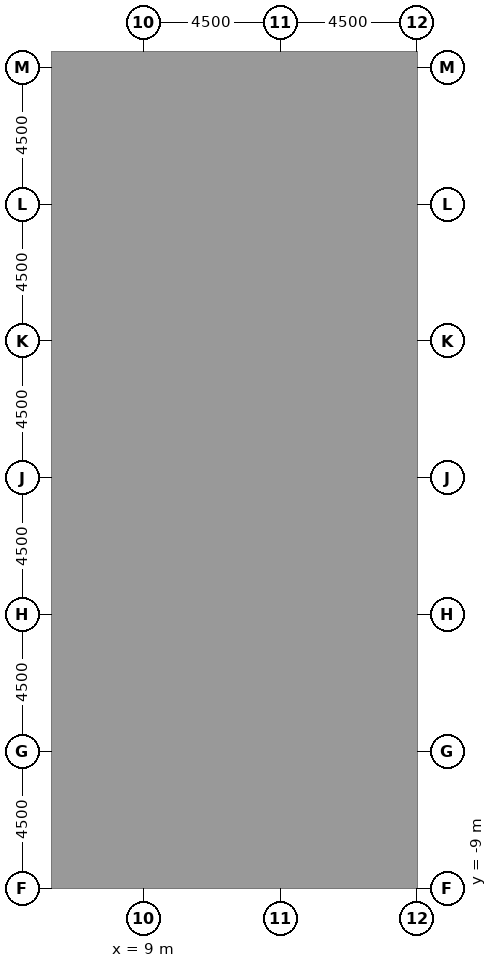
"""IFC4 building model, lengths in metres.
Left out: names, types, materials, properties, quantities, classifications, styles, units other than length and angle.
Written with IfcOpenShell. Run it as: python <this file> out.ifc"""

import sys

from ifc_helpers import new_model, si_unit, direction, frame, frame_2d, origin, place, context, subcontext, project, spatial, rectangle, extrude, element, fill, save


model = new_model("IFC4")
c1 = context("Model", 3, precision=1e-05, world=origin(), true_north=direction((0.0, 1.0)))
c2 = subcontext(c1, "Body", "Model", "MODEL_VIEW")
j1 = project(units=[si_unit("LENGTHUNIT", "METRE"), si_unit("PLANEANGLEUNIT", "RADIAN")], contexts=[c1])
p1 = place(None, origin())
s1 = spatial("IfcSite", under=j1, at=p1, CompositionType="ELEMENT")
p2 = place(p1, origin())
s2 = spatial("IfcBuilding", under=s1, at=p2, CompositionType="ELEMENT")
p3 = place(p2, origin())
s3 = spatial("IfcBuildingStorey", under=s2, at=p3, CompositionType="ELEMENT", Elevation=0.0)
p4 = place(p3, frame((6.5, -9.0, 0.0), z_axis=(0.0, 0.0, 1.0), x_axis=(0.0, 1.0, 0.0)))
e1 = element("IfcWall", 1, at=p4, inside=s3, PredefinedType="SHEAR", context=c2, shape_type="SweptSolid", body=[
    extrude(rectangle(XDim=27.5, YDim=1.0, at=frame_2d((13.75, 0.0))), origin(), (0.0, 0.0, 1.0), 7.2),
])
p5 = place(p4, frame((12.55, 0.0, 0.0)))
e2 = element("IfcOpeningElement", 2, at=p5, cuts=e1, PredefinedType="OPENING", context=c2, shape_type="SweptSolid", body=[
    extrude(rectangle(XDim=2.4, YDim=2.4, at=frame_2d((1.2, 1.2))), frame((0.0, 0.51, 0.0), z_axis=(0.0, -1.0, 0.0), x_axis=(1.0, 0.0, 0.0)), (0.0, 0.0, 1.0), 1.02),
])
p6 = place(p4, frame((3.955, 0.0, 0.0)))
e3 = element("IfcOpeningElement", 3, at=p6, cuts=e1, PredefinedType="OPENING", context=c2, shape_type="SweptSolid", body=[
    extrude(rectangle(XDim=0.905, YDim=2.1, at=frame_2d((0.453, 1.05))), frame((0.0, 0.51, 0.0), z_axis=(0.0, -1.0, 0.0), x_axis=(1.0, 0.0, 0.0)), (0.0, 0.0, 1.0), 1.02),
])
p7 = place(p4, frame((23.363, 0.0, 0.0)))
e4 = element("IfcOpeningElement", 4, at=p7, cuts=e1, PredefinedType="OPENING", context=c2, shape_type="SweptSolid", body=[
    extrude(rectangle(XDim=1.2, YDim=2.1, at=frame_2d((0.6, 1.05))), frame((0.0, 0.51, 0.0), z_axis=(0.0, -1.0, 0.0), x_axis=(1.0, 0.0, 0.0)), (0.0, 0.0, 1.0), 1.02),
])
p8 = place(p3, frame((17.5, -9.0, 0.0), z_axis=(0.0, 0.0, 1.0), x_axis=(0.0, 1.0, 0.0)))
e5 = element("IfcWall", 5, at=p8, inside=s3, PredefinedType="SHEAR", context=c2, shape_type="SweptSolid", body=[
    extrude(rectangle(XDim=27.5, YDim=1.0, at=frame_2d((13.75, 0.0))), origin(), (0.0, 0.0, 1.0), 7.2),
])
p9 = place(p8, frame((12.55, 0.0, 0.0)))
e6 = element("IfcOpeningElement", 6, at=p9, cuts=e5, PredefinedType="OPENING", context=c2, shape_type="SweptSolid", body=[
    extrude(rectangle(XDim=2.4, YDim=2.4, at=frame_2d((1.2, 1.2))), frame((0.0, 0.51, 0.0), z_axis=(0.0, -1.0, 0.0), x_axis=(1.0, 0.0, 0.0)), (0.0, 0.0, 1.0), 1.02),
])
p10 = place(p8, frame((6.825, 0.0, 0.0)))
e7 = element("IfcOpeningElement", 7, at=p10, cuts=e5, PredefinedType="OPENING", context=c2, shape_type="SweptSolid", body=[
    extrude(rectangle(XDim=1.2, YDim=2.1, at=frame_2d((0.6, 1.05))), frame((0.0, 0.51, 0.0), z_axis=(0.0, -1.0, 0.0), x_axis=(1.0, 0.0, 0.0)), (0.0, 0.0, 1.0), 1.02),
])
p11 = place(p8, frame((19.475, 0.0, 0.0)))
e8 = element("IfcOpeningElement", 8, at=p11, cuts=e5, PredefinedType="OPENING", context=c2, shape_type="SweptSolid", body=[
    extrude(rectangle(XDim=1.2, YDim=2.1, at=frame_2d((0.6, 1.05))), frame((0.0, 0.51, 0.0), z_axis=(0.0, -1.0, 0.0), x_axis=(1.0, 0.0, 0.0)), (0.0, 0.0, 1.0), 1.02),
])
for number, where, z_axis, x_axis in (
    (9, (7.0, -8.5, 0.0), (0.0, 0.0, 1.0), (1.0, 0.0, 0.0)),
    (10, (7.0, 18.0, 0.0), (0.0, 0.0, 1.0), (1.0, 0.0, 0.0)),
):
    element("IfcWall", number, at=place(p3, frame(where, z_axis=z_axis, x_axis=x_axis)), inside=s3, PredefinedType="SHEAR", context=c2, shape_type="SweptSolid", body=[
        extrude(rectangle(XDim=10.0, YDim=1.0, at=frame_2d((5.0, 0.0))), origin(), (0.0, 0.0, 1.0), 7.2),
    ])
p12 = place(p3, frame((7.0, -0.5, 0.0), z_axis=(0.0, 0.0, 1.0), x_axis=(1.0, 0.0, 0.0)))
e11 = element("IfcWall", 11, at=p12, inside=s3, PredefinedType="SHEAR", context=c2, shape_type="SweptSolid", body=[
    extrude(rectangle(XDim=10.0, YDim=0.5, at=frame_2d((5.0, 0.0))), origin(), (0.0, 0.0, 1.0), 7.2),
])
p13 = place(p3, frame((7.0, 2.8, 0.0), z_axis=(0.0, 0.0, 1.0), x_axis=(1.0, 0.0, 0.0)))
e12 = element("IfcWall", 12, at=p13, inside=s3, PredefinedType="SHEAR", context=c2, shape_type="SweptSolid", body=[
    extrude(rectangle(XDim=10.0, YDim=0.5, at=frame_2d((5.0, 0.0))), origin(), (0.0, 0.0, 1.0), 7.2),
])
p14 = place(p13, frame((0.512, 0.0, 0.0)))
e13 = element("IfcOpeningElement", 13, at=p14, cuts=e12, PredefinedType="OPENING", context=c2, shape_type="SweptSolid", body=[
    extrude(rectangle(XDim=1.1, YDim=2.1, at=frame_2d((0.55, 1.05))), frame((0.0, 0.26, 0.0), z_axis=(0.0, -1.0, 0.0), x_axis=(1.0, 0.0, 0.0)), (0.0, 0.0, 1.0), 0.52),
])
p15 = place(p13, frame((3.137, 0.0, 0.0)))
e14 = element("IfcOpeningElement", 14, at=p15, cuts=e12, PredefinedType="OPENING", context=c2, shape_type="SweptSolid", body=[
    extrude(rectangle(XDim=1.1, YDim=2.1, at=frame_2d((0.55, 1.05))), frame((0.0, 0.26, 0.0), z_axis=(0.0, -1.0, 0.0), x_axis=(1.0, 0.0, 0.0)), (0.0, 0.0, 1.0), 0.52),
])
p16 = place(p13, frame((5.762, 0.0, 0.0)))
e15 = element("IfcOpeningElement", 15, at=p16, cuts=e12, PredefinedType="OPENING", context=c2, shape_type="SweptSolid", body=[
    extrude(rectangle(XDim=1.1, YDim=2.1, at=frame_2d((0.55, 1.05))), frame((0.0, 0.26, 0.0), z_axis=(0.0, -1.0, 0.0), x_axis=(1.0, 0.0, 0.0)), (0.0, 0.0, 1.0), 0.52),
])
p17 = place(p13, frame((8.387, 0.0, 0.0)))
e16 = element("IfcOpeningElement", 16, at=p17, cuts=e12, PredefinedType="OPENING", context=c2, shape_type="SweptSolid", body=[
    extrude(rectangle(XDim=1.1, YDim=2.1, at=frame_2d((0.55, 1.05))), frame((0.0, 0.26, 0.0), z_axis=(0.0, -1.0, 0.0), x_axis=(1.0, 0.0, 0.0)), (0.0, 0.0, 1.0), 0.52),
])
p18 = place(p3, frame((7.0, 6.7, 0.0), z_axis=(0.0, 0.0, 1.0), x_axis=(1.0, 0.0, 0.0)))
e17 = element("IfcWall", 17, at=p18, inside=s3, PredefinedType="SHEAR", context=c2, shape_type="SweptSolid", body=[
    extrude(rectangle(XDim=10.0, YDim=0.5, at=frame_2d((5.0, 0.0))), origin(), (0.0, 0.0, 1.0), 7.2),
])
p19 = place(p18, frame((0.512, 0.0, 0.0)))
e18 = element("IfcOpeningElement", 18, at=p19, cuts=e17, PredefinedType="OPENING", context=c2, shape_type="SweptSolid", body=[
    extrude(rectangle(XDim=1.1, YDim=2.1, at=frame_2d((0.55, 1.05))), frame((0.0, 0.26, 0.0), z_axis=(0.0, -1.0, 0.0), x_axis=(1.0, 0.0, 0.0)), (0.0, 0.0, 1.0), 0.52),
])
p20 = place(p18, frame((3.188, 0.0, 0.0)))
e19 = element("IfcOpeningElement", 19, at=p20, cuts=e17, PredefinedType="OPENING", context=c2, shape_type="SweptSolid", body=[
    extrude(rectangle(XDim=1.0, YDim=2.1, at=frame_2d((0.5, 1.05))), frame((0.0, 0.26, 0.0), z_axis=(0.0, -1.0, 0.0), x_axis=(1.0, 0.0, 0.0)), (0.0, 0.0, 1.0), 0.52),
])
p21 = place(p18, frame((5.812, 0.0, 0.0)))
e20 = element("IfcOpeningElement", 20, at=p21, cuts=e17, PredefinedType="OPENING", context=c2, shape_type="SweptSolid", body=[
    extrude(rectangle(XDim=1.0, YDim=2.1, at=frame_2d((0.5, 1.05))), frame((0.0, 0.26, 0.0), z_axis=(0.0, -1.0, 0.0), x_axis=(1.0, 0.0, 0.0)), (0.0, 0.0, 1.0), 0.52),
])
p22 = place(p18, frame((8.438, 0.0, 0.0)))
e21 = element("IfcOpeningElement", 21, at=p22, cuts=e17, PredefinedType="OPENING", context=c2, shape_type="SweptSolid", body=[
    extrude(rectangle(XDim=1.0, YDim=2.1, at=frame_2d((0.5, 1.05))), frame((0.0, 0.26, 0.0), z_axis=(0.0, -1.0, 0.0), x_axis=(1.0, 0.0, 0.0)), (0.0, 0.0, 1.0), 0.52),
])
p23 = place(p3, frame((7.0, 10.0, 0.0), z_axis=(0.0, 0.0, 1.0), x_axis=(1.0, 0.0, 0.0)))
e22 = element("IfcWall", 22, at=p23, inside=s3, PredefinedType="SHEAR", context=c2, shape_type="SweptSolid", body=[
    extrude(rectangle(XDim=10.0, YDim=0.5, at=frame_2d((5.0, 0.0))), origin(), (0.0, 0.0, 1.0), 7.2),
])
for number, where, z_axis, x_axis in (
    (23, (9.375, -0.25, 0.0), (0.0, 0.0, 1.0), (0.0, 1.0, 0.0)),
    (24, (9.375, 6.95, 0.0), (0.0, 0.0, 1.0), (0.0, 1.0, 0.0)),
    (25, (12.0, -0.25, 0.0), (0.0, 0.0, 1.0), (0.0, 1.0, 0.0)),
    (26, (12.0, 6.95, 0.0), (0.0, 0.0, 1.0), (0.0, 1.0, 0.0)),
    (27, (14.625, -0.25, 0.0), (0.0, 0.0, 1.0), (0.0, 1.0, 0.0)),
    (28, (14.625, 6.95, 0.0), (0.0, 0.0, 1.0), (0.0, 1.0, 0.0)),
):
    element("IfcWall", number, at=place(p3, frame(where, z_axis=z_axis, x_axis=x_axis)), inside=s3, PredefinedType="SHEAR", context=c2, shape_type="SweptSolid", body=[
        extrude(rectangle(XDim=2.8, YDim=0.5, at=frame_2d((1.4, 0.0))), origin(), (0.0, 0.0, 1.0), 7.2),
    ])
for number, where, z_axis, x_axis in (
    (29, (12.0, -8.0, 0.0), (0.0, 0.0, 1.0), (0.0, 1.0, 0.0)),
    (30, (12.0, 10.25, 0.0), (0.0, 0.0, 1.0), (0.0, 1.0, 0.0)),
):
    element("IfcWall", number, at=place(p3, frame(where, z_axis=z_axis, x_axis=x_axis)), inside=s3, PredefinedType="SHEAR", context=c2, shape_type="SweptSolid", body=[
        extrude(rectangle(XDim=7.25, YDim=0.5, at=frame_2d((3.625, 0.0))), origin(), (0.0, 0.0, 1.0), 7.2),
    ])
p24 = place(p3, frame((7.0, -5.245, 0.0), z_axis=(0.0, 0.0, 1.0), x_axis=(1.0, 0.0, 0.0)))
e31 = element("IfcWall", 31, at=p24, inside=s3, PredefinedType="PARTITIONING", context=c2, shape_type="SweptSolid", body=[
    extrude(rectangle(XDim=4.75, YDim=0.1, at=frame_2d((2.375, 0.0))), origin(), (0.0, 0.0, 1.0), 6.75),
])
p25 = place(p24, frame((1.875, 0.0, 0.0)))
e32 = element("IfcOpeningElement", 32, at=p25, cuts=e31, PredefinedType="OPENING", context=c2, shape_type="SweptSolid", body=[
    extrude(rectangle(XDim=1.0, YDim=2.1, at=frame_2d((0.5, 1.05))), frame((0.0, 0.06, 0.0), z_axis=(0.0, -1.0, 0.0), x_axis=(1.0, 0.0, 0.0)), (0.0, 0.0, 1.0), 0.12),
])
p26 = place(p3, frame((7.0, -3.94, 0.0), z_axis=(0.0, 0.0, 1.0), x_axis=(1.0, 0.0, 0.0)))
e33 = element("IfcWall", 33, at=p26, inside=s3, PredefinedType="PARTITIONING", context=c2, shape_type="SweptSolid", body=[
    extrude(rectangle(XDim=2.945, YDim=0.1, at=frame_2d((1.473, 0.0))), origin(), (0.0, 0.0, 1.0), 6.75),
])
p27 = place(p26, frame((0.972, 0.0, 0.0)))
e34 = element("IfcOpeningElement", 34, at=p27, cuts=e33, PredefinedType="OPENING", context=c2, shape_type="SweptSolid", body=[
    extrude(rectangle(XDim=1.0, YDim=2.1, at=frame_2d((0.5, 1.05))), frame((0.0, 0.06, 0.0), z_axis=(0.0, -1.0, 0.0), x_axis=(1.0, 0.0, 0.0)), (0.0, 0.0, 1.0), 0.12),
])
p28 = place(p3, frame((9.945, -3.94, 0.0), z_axis=(0.0, 0.0, 1.0), x_axis=(1.0, 0.0, 0.0)))
e35 = element("IfcWall", 35, at=p28, inside=s3, PredefinedType="PARTITIONING", context=c2, shape_type="SweptSolid", body=[
    extrude(rectangle(XDim=1.805, YDim=0.1, at=frame_2d((0.902, 0.0))), origin(), (0.0, 0.0, 1.0), 6.75),
])
p29 = place(p28, frame((0.403, 0.0, 0.0)))
e36 = element("IfcOpeningElement", 36, at=p29, cuts=e35, PredefinedType="OPENING", context=c2, shape_type="SweptSolid", body=[
    extrude(rectangle(XDim=1.0, YDim=2.1, at=frame_2d((0.5, 1.05))), frame((0.0, 0.06, 0.0), z_axis=(0.0, -1.0, 0.0), x_axis=(1.0, 0.0, 0.0)), (0.0, 0.0, 1.0), 0.12),
])
p30 = place(p3, frame((9.945, -3.94, 0.0), z_axis=(0.0, 0.0, 1.0), x_axis=(0.0, 1.0, 0.0)))
e37 = element("IfcWall", 37, at=p30, inside=s3, PredefinedType="PARTITIONING", context=c2, shape_type="SweptSolid", body=[
    extrude(rectangle(XDim=3.19, YDim=0.1, at=frame_2d((1.595, 0.0))), origin(), (0.0, 0.0, 1.0), 6.75),
])
p31 = place(p3, frame((7.0, 12.425, 0.0), z_axis=(0.0, 0.0, 1.0), x_axis=(1.0, 0.0, 0.0)))
e38 = element("IfcWall", 38, at=p31, inside=s3, PredefinedType="PARTITIONING", context=c2, shape_type="SweptSolid", body=[
    extrude(rectangle(XDim=1.3, YDim=0.1, at=frame_2d((0.65, 0.0))), origin(), (0.0, 0.0, 1.0), 6.75),
])
p32 = place(p31, frame((0.2, 0.0, 0.0)))
e39 = element("IfcOpeningElement", 39, at=p32, cuts=e38, PredefinedType="OPENING", context=c2, shape_type="SweptSolid", body=[
    extrude(rectangle(XDim=0.9, YDim=2.1, at=frame_2d((0.45, 1.05))), frame((0.0, 0.06, 0.0), z_axis=(0.0, -1.0, 0.0), x_axis=(1.0, 0.0, 0.0)), (0.0, 0.0, 1.0), 0.12),
])
p33 = place(p3, frame((8.3, 12.425, 0.0), z_axis=(0.0, 0.0, 1.0), x_axis=(1.0, 0.0, 0.0)))
e40 = element("IfcWall", 40, at=p33, inside=s3, PredefinedType="PARTITIONING", context=c2, shape_type="SweptSolid", body=[
    extrude(rectangle(XDim=3.45, YDim=0.1, at=frame_2d((1.725, 0.0))), origin(), (0.0, 0.0, 1.0), 6.75),
])
p34 = place(p3, frame((8.3, 12.425, 0.0), z_axis=(0.0, 0.0, 1.0), x_axis=(0.0, 1.0, 0.0)))
e41 = element("IfcWall", 41, at=p34, inside=s3, PredefinedType="PARTITIONING", context=c2, shape_type="SweptSolid", body=[
    extrude(rectangle(XDim=2.537, YDim=0.1, at=frame_2d((1.269, 0.0))), origin(), (0.0, 0.0, 1.0), 6.75),
])
p35 = place(p34, frame((0.769, 0.0, 0.0)))
e42 = element("IfcOpeningElement", 42, at=p35, cuts=e41, PredefinedType="OPENING", context=c2, shape_type="SweptSolid", body=[
    extrude(rectangle(XDim=1.0, YDim=2.1, at=frame_2d((0.5, 1.05))), frame((0.0, 0.06, 0.0), z_axis=(0.0, -1.0, 0.0), x_axis=(1.0, 0.0, 0.0)), (0.0, 0.0, 1.0), 0.12),
])
p36 = place(p3, frame((8.3, 14.962, 0.0), z_axis=(0.0, 0.0, 1.0), x_axis=(0.0, 1.0, 0.0)))
e43 = element("IfcWall", 43, at=p36, inside=s3, PredefinedType="PARTITIONING", context=c2, shape_type="SweptSolid", body=[
    extrude(rectangle(XDim=2.538, YDim=0.1, at=frame_2d((1.269, 0.0))), origin(), (0.0, 0.0, 1.0), 6.75),
])
p37 = place(p36, frame((0.769, 0.0, 0.0)))
e44 = element("IfcOpeningElement", 44, at=p37, cuts=e43, PredefinedType="OPENING", context=c2, shape_type="SweptSolid", body=[
    extrude(rectangle(XDim=1.0, YDim=2.1, at=frame_2d((0.5, 1.05))), frame((0.0, 0.06, 0.0), z_axis=(0.0, -1.0, 0.0), x_axis=(1.0, 0.0, 0.0)), (0.0, 0.0, 1.0), 0.12),
])
p38 = place(p3, frame((8.3, 14.962, 0.0), z_axis=(0.0, 0.0, 1.0), x_axis=(1.0, 0.0, 0.0)))
e45 = element("IfcWall", 45, at=p38, inside=s3, PredefinedType="PARTITIONING", context=c2, shape_type="SweptSolid", body=[
    extrude(rectangle(XDim=3.45, YDim=0.1, at=frame_2d((1.725, 0.0))), origin(), (0.0, 0.0, 1.0), 6.75),
])
p39 = place(p14, origin())
e46 = element("IfcDoor", 46, at=p39, inside=s3, OperationType="DOUBLE_DOOR_SLIDING", PredefinedType="DOOR", context=c2, shape_type="SweptSolid", body=[
    extrude(rectangle(XDim=1.1, YDim=2.1, at=frame_2d((0.55, 1.05))), frame((0.0, 0.025, 0.0), z_axis=(0.0, -1.0, 0.0), x_axis=(1.0, 0.0, 0.0)), (0.0, 0.0, 1.0), 0.05),
])
fill(e13, e46)
p40 = place(p15, origin())
e47 = element("IfcDoor", 47, at=p40, inside=s3, OperationType="DOUBLE_DOOR_SLIDING", PredefinedType="DOOR", context=c2, shape_type="SweptSolid", body=[
    extrude(rectangle(XDim=1.1, YDim=2.1, at=frame_2d((0.55, 1.05))), frame((0.0, 0.025, 0.0), z_axis=(0.0, -1.0, 0.0), x_axis=(1.0, 0.0, 0.0)), (0.0, 0.0, 1.0), 0.05),
])
fill(e14, e47)
p41 = place(p16, origin())
e48 = element("IfcDoor", 48, at=p41, inside=s3, OperationType="DOUBLE_DOOR_SLIDING", PredefinedType="DOOR", context=c2, shape_type="SweptSolid", body=[
    extrude(rectangle(XDim=1.1, YDim=2.1, at=frame_2d((0.55, 1.05))), frame((0.0, 0.025, 0.0), z_axis=(0.0, -1.0, 0.0), x_axis=(1.0, 0.0, 0.0)), (0.0, 0.0, 1.0), 0.05),
])
fill(e15, e48)
p42 = place(p17, origin())
e49 = element("IfcDoor", 49, at=p42, inside=s3, OperationType="DOUBLE_DOOR_SLIDING", PredefinedType="DOOR", context=c2, shape_type="SweptSolid", body=[
    extrude(rectangle(XDim=1.1, YDim=2.1, at=frame_2d((0.55, 1.05))), frame((0.0, 0.025, 0.0), z_axis=(0.0, -1.0, 0.0), x_axis=(1.0, 0.0, 0.0)), (0.0, 0.0, 1.0), 0.05),
])
fill(e16, e49)
p43 = place(p19, origin())
e50 = element("IfcDoor", 50, at=p43, inside=s3, OperationType="DOUBLE_DOOR_SLIDING", PredefinedType="DOOR", context=c2, shape_type="SweptSolid", body=[
    extrude(rectangle(XDim=1.1, YDim=2.1, at=frame_2d((0.55, 1.05))), frame((0.0, 0.025, 0.0), z_axis=(0.0, -1.0, 0.0), x_axis=(1.0, 0.0, 0.0)), (0.0, 0.0, 1.0), 0.05),
])
fill(e18, e50)
p44 = place(p5, origin())
e51 = element("IfcDoor", 51, at=p44, inside=s3, OperationType="DOUBLE_DOOR_DOUBLE_SWING", PredefinedType="DOOR", context=c2, shape_type="SweptSolid", body=[
    extrude(rectangle(XDim=2.4, YDim=2.4, at=frame_2d((1.2, 1.2))), frame((0.0, 0.025, 0.0), z_axis=(0.0, -1.0, 0.0), x_axis=(1.0, 0.0, 0.0)), (0.0, 0.0, 1.0), 0.05),
])
fill(e2, e51)
p45 = place(p9, origin())
e52 = element("IfcDoor", 52, at=p45, inside=s3, OperationType="DOUBLE_DOOR_DOUBLE_SWING", PredefinedType="DOOR", context=c2, shape_type="SweptSolid", body=[
    extrude(rectangle(XDim=2.4, YDim=2.4, at=frame_2d((1.2, 1.2))), frame((0.0, 0.025, 0.0), z_axis=(0.0, -1.0, 0.0), x_axis=(1.0, 0.0, 0.0)), (0.0, 0.0, 1.0), 0.05),
])
fill(e6, e52)
p46 = place(p10, frame((1.2, 0.0, 0.0), z_axis=(0.0, 0.0, 1.0), x_axis=(-1.0, 0.0, 0.0)))
e53 = element("IfcDoor", 53, at=p46, inside=s3, OperationType="SINGLE_SWING_LEFT", PredefinedType="DOOR", context=c2, shape_type="SweptSolid", body=[
    extrude(rectangle(XDim=1.2, YDim=2.1, at=frame_2d((0.6, 1.05))), frame((0.0, 0.025, 0.0), z_axis=(0.0, -1.0, 0.0), x_axis=(1.0, 0.0, 0.0)), (0.0, 0.0, 1.0), 0.05),
])
fill(e7, e53)
p47 = place(p11, frame((1.2, 0.0, 0.0), z_axis=(0.0, 0.0, 1.0), x_axis=(-1.0, 0.0, 0.0)))
e54 = element("IfcDoor", 54, at=p47, inside=s3, OperationType="SINGLE_SWING_LEFT", PredefinedType="DOOR", context=c2, shape_type="SweptSolid", body=[
    extrude(rectangle(XDim=1.2, YDim=2.1, at=frame_2d((0.6, 1.05))), frame((0.0, 0.025, 0.0), z_axis=(0.0, -1.0, 0.0), x_axis=(1.0, 0.0, 0.0)), (0.0, 0.0, 1.0), 0.05),
])
fill(e8, e54)
p48 = place(p20, origin())
e55 = element("IfcDoor", 55, at=p48, inside=s3, OperationType="SINGLE_SWING_RIGHT", PredefinedType="DOOR", context=c2, shape_type="SweptSolid", body=[
    extrude(rectangle(XDim=1.0, YDim=2.1, at=frame_2d((0.5, 1.05))), frame((0.0, 0.025, 0.0), z_axis=(0.0, -1.0, 0.0), x_axis=(1.0, 0.0, 0.0)), (0.0, 0.0, 1.0), 0.05),
])
fill(e19, e55)
p49 = place(p21, origin())
e56 = element("IfcDoor", 56, at=p49, inside=s3, OperationType="SINGLE_SWING_LEFT", PredefinedType="DOOR", context=c2, shape_type="SweptSolid", body=[
    extrude(rectangle(XDim=1.0, YDim=2.1, at=frame_2d((0.5, 1.05))), frame((0.0, 0.025, 0.0), z_axis=(0.0, -1.0, 0.0), x_axis=(1.0, 0.0, 0.0)), (0.0, 0.0, 1.0), 0.05),
])
fill(e20, e56)
p50 = place(p22, origin())
e57 = element("IfcDoor", 57, at=p50, inside=s3, OperationType="SINGLE_SWING_RIGHT", PredefinedType="DOOR", context=c2, shape_type="SweptSolid", body=[
    extrude(rectangle(XDim=1.0, YDim=2.1, at=frame_2d((0.5, 1.05))), frame((0.0, 0.025, 0.0), z_axis=(0.0, -1.0, 0.0), x_axis=(1.0, 0.0, 0.0)), (0.0, 0.0, 1.0), 0.05),
])
fill(e21, e57)
p51 = place(p6, origin())
e58 = element("IfcDoor", 58, at=p51, inside=s3, OperationType="SINGLE_SWING_RIGHT", PredefinedType="DOOR", context=c2, shape_type="SweptSolid", body=[
    extrude(rectangle(XDim=0.905, YDim=2.1, at=frame_2d((0.453, 1.05))), frame((0.0, -0.425, 0.0), z_axis=(0.0, -1.0, 0.0), x_axis=(1.0, 0.0, 0.0)), (0.0, 0.0, 1.0), 0.05),
])
fill(e3, e58)
p52 = place(p25, origin())
e59 = element("IfcDoor", 59, at=p52, inside=s3, OperationType="SINGLE_SWING_LEFT", PredefinedType="DOOR", context=c2, shape_type="SweptSolid", body=[
    extrude(rectangle(XDim=1.0, YDim=2.1, at=frame_2d((0.5, 1.05))), frame((0.0, 0.025, 0.0), z_axis=(0.0, -1.0, 0.0), x_axis=(1.0, 0.0, 0.0)), (0.0, 0.0, 1.0), 0.05),
])
fill(e32, e59)
p53 = place(p27, origin())
e60 = element("IfcDoor", 60, at=p53, inside=s3, OperationType="SINGLE_SWING_RIGHT", PredefinedType="DOOR", context=c2, shape_type="SweptSolid", body=[
    extrude(rectangle(XDim=1.0, YDim=2.1, at=frame_2d((0.5, 1.05))), frame((0.0, 0.025, 0.0), z_axis=(0.0, -1.0, 0.0), x_axis=(1.0, 0.0, 0.0)), (0.0, 0.0, 1.0), 0.05),
])
fill(e34, e60)
p54 = place(p29, origin())
e61 = element("IfcDoor", 61, at=p54, inside=s3, OperationType="SINGLE_SWING_LEFT", PredefinedType="DOOR", context=c2, shape_type="SweptSolid", body=[
    extrude(rectangle(XDim=1.0, YDim=2.1, at=frame_2d((0.5, 1.05))), frame((0.0, 0.025, 0.0), z_axis=(0.0, -1.0, 0.0), x_axis=(1.0, 0.0, 0.0)), (0.0, 0.0, 1.0), 0.05),
])
fill(e36, e61)
p55 = place(p32, origin())
e62 = element("IfcDoor", 62, at=p55, inside=s3, OperationType="SINGLE_SWING_RIGHT", PredefinedType="DOOR", context=c2, shape_type="SweptSolid", body=[
    extrude(rectangle(XDim=0.9, YDim=2.1, at=frame_2d((0.45, 1.05))), frame((0.0, 0.025, 0.0), z_axis=(0.0, -1.0, 0.0), x_axis=(1.0, 0.0, 0.0)), (0.0, 0.0, 1.0), 0.05),
])
fill(e39, e62)
p56 = place(p7, origin())
e63 = element("IfcDoor", 63, at=p56, inside=s3, OperationType="SINGLE_SWING_LEFT", PredefinedType="DOOR", context=c2, shape_type="SweptSolid", body=[
    extrude(rectangle(XDim=1.2, YDim=2.1, at=frame_2d((0.6, 1.05))), frame((0.0, -0.425, 0.0), z_axis=(0.0, -1.0, 0.0), x_axis=(1.0, 0.0, 0.0)), (0.0, 0.0, 1.0), 0.05),
])
fill(e4, e63)
p57 = place(p35, origin())
e64 = element("IfcDoor", 64, at=p57, inside=s3, OperationType="SINGLE_SWING_RIGHT", PredefinedType="DOOR", context=c2, shape_type="SweptSolid", body=[
    extrude(rectangle(XDim=1.0, YDim=2.1, at=frame_2d((0.5, 1.05))), frame((0.0, 0.025, 0.0), z_axis=(0.0, -1.0, 0.0), x_axis=(1.0, 0.0, 0.0)), (0.0, 0.0, 1.0), 0.05),
])
fill(e42, e64)
p58 = place(p37, origin())
e65 = element("IfcDoor", 65, at=p58, inside=s3, OperationType="SINGLE_SWING_LEFT", PredefinedType="DOOR", context=c2, shape_type="SweptSolid", body=[
    extrude(rectangle(XDim=1.0, YDim=2.1, at=frame_2d((0.5, 1.05))), frame((0.0, 0.025, 0.0), z_axis=(0.0, -1.0, 0.0), x_axis=(1.0, 0.0, 0.0)), (0.0, 0.0, 1.0), 0.05),
])
fill(e44, e65)
save(model, sys.argv[1])
